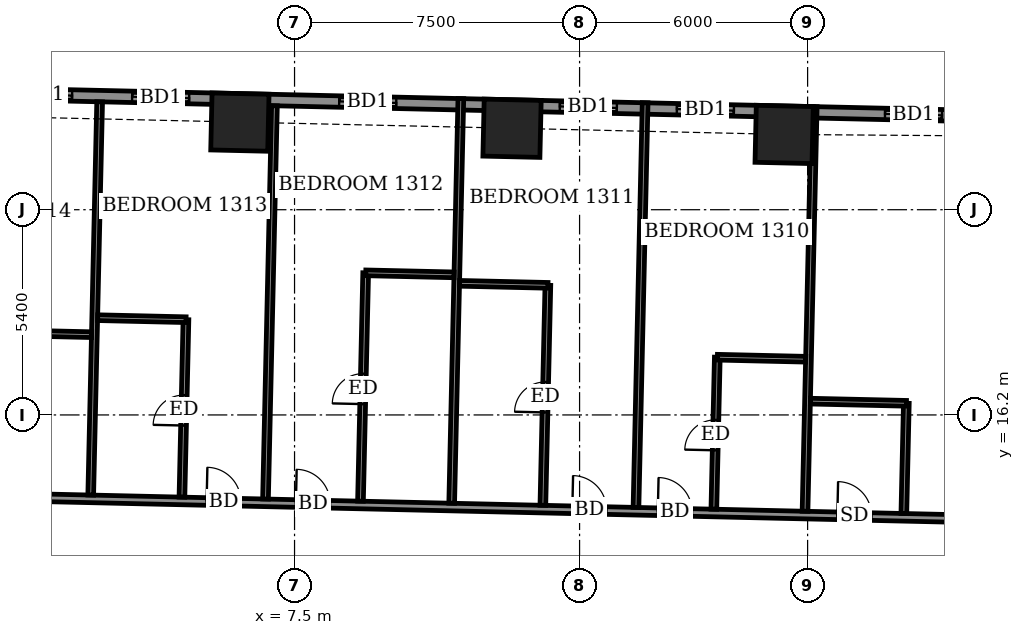
"""IFC4 building model, lengths in metres.
Left out: names, types, materials, properties, quantities, classifications, styles, units other than length and angle.
Written with IfcOpenShell. Run it as: python <this file> out.ifc"""

import sys

from ifc_helpers import new_model, si_unit, direction, frame, frame_2d, origin, origin_2d, place, context, subcontext, project, spatial, rectangle, extrude, element, fill, save


model = new_model("IFC4")
c1 = context("Model", 3, precision=1e-05, world=origin(), true_north=direction((0.0, 1.0)))
c2 = subcontext(c1, "Body", "Model", "MODEL_VIEW")
j1 = project(units=[si_unit("LENGTHUNIT", "METRE"), si_unit("PLANEANGLEUNIT", "RADIAN")], contexts=[c1])
p1 = place(None, origin())
s1 = spatial("IfcSite", under=j1, at=p1, CompositionType="ELEMENT")
p2 = place(p1, origin())
s2 = spatial("IfcBuilding", under=s1, at=p2, CompositionType="ELEMENT")
p3 = place(p2, frame((0.0, 0.0, 56.7)))
s3 = spatial("IfcBuildingStorey", under=s2, at=p3, CompositionType="ELEMENT", Elevation=56.7)
for number, where, z_axis, x_axis in (
    (1, (20.383, 23.58, -0.55), (0.0, 0.0, 1.0), (-1.0, 0.023, 0.0)),
    (2, (13.223, 23.743, -0.55), (0.0, 0.0, 1.0), (-1.0, 0.023, 0.0)),
    (3, (6.062, 23.905, -0.55), (0.0, 0.0, 1.0), (-1.0, 0.023, 0.0)),
):
    element("IfcColumn", number, at=place(p3, frame(where, z_axis=z_axis, x_axis=x_axis)), inside=s3, PredefinedType="COLUMN", context=c2, shape_type="SweptSolid", body=[
        extrude(rectangle(XDim=1.5, YDim=1.5, at=origin_2d()), origin(), (0.0, 0.0, 1.0), 3.6),
    ])
p4 = place(p3, frame((27.407, 24.021, 0.0), z_axis=(0.0, 0.0, 1.0), x_axis=(-0.99974239923, 0.022696589664, 0.0)))
e4 = element("IfcWall", 4, at=p4, inside=s3, PredefinedType="SOLIDWALL", context=c2, shape_type="SweptSolid", body=[
    extrude(rectangle(XDim=49.836, YDim=0.3, at=frame_2d((24.918, 0.0))), origin(), (0.0, 0.0, 1.0), 3.05),
])
p5 = place(p4, frame((2.871, 0.0, 0.0)))
e5 = element("IfcOpeningElement", 5, at=p5, cuts=e4, PredefinedType="OPENING", context=c2, shape_type="SweptSolid", body=[
    extrude(rectangle(XDim=1.5, YDim=2.4, at=frame_2d((0.75, 1.2))), frame((0.0, 0.16, 0.0), z_axis=(0.0, -1.0, 0.0), x_axis=(1.0, 0.0, 0.0)), (0.0, 0.0, 1.0), 0.32),
])
p6 = place(p4, frame((8.349, 0.0, 0.0)))
e6 = element("IfcOpeningElement", 6, at=p6, cuts=e4, PredefinedType="OPENING", context=c2, shape_type="SweptSolid", body=[
    extrude(rectangle(XDim=1.5, YDim=2.4, at=frame_2d((0.75, 1.2))), frame((0.0, 0.16, 0.0), z_axis=(0.0, -1.0, 0.0), x_axis=(1.0, 0.0, 0.0)), (0.0, 0.0, 1.0), 0.32),
])
p7 = place(p4, frame((11.43, 0.0, 0.0)))
e7 = element("IfcOpeningElement", 7, at=p7, cuts=e4, PredefinedType="OPENING", context=c2, shape_type="SweptSolid", body=[
    extrude(rectangle(XDim=1.5, YDim=2.4, at=frame_2d((0.75, 1.2))), frame((0.0, 0.16, 0.0), z_axis=(0.0, -1.0, 0.0), x_axis=(1.0, 0.0, 0.0)), (0.0, 0.0, 1.0), 0.32),
])
p8 = place(p4, frame((17.236, 0.0, 0.0)))
e8 = element("IfcOpeningElement", 8, at=p8, cuts=e4, PredefinedType="OPENING", context=c2, shape_type="SweptSolid", body=[
    extrude(rectangle(XDim=1.5, YDim=2.4, at=frame_2d((0.75, 1.2))), frame((0.0, 0.16, 0.0), z_axis=(0.0, -1.0, 0.0), x_axis=(1.0, 0.0, 0.0)), (0.0, 0.0, 1.0), 0.32),
])
p9 = place(p4, frame((22.686, 0.0, 0.0)))
e9 = element("IfcOpeningElement", 9, at=p9, cuts=e4, PredefinedType="OPENING", context=c2, shape_type="SweptSolid", body=[
    extrude(rectangle(XDim=1.5, YDim=2.4, at=frame_2d((0.75, 1.2))), frame((0.0, 0.16, 0.0), z_axis=(0.0, -1.0, 0.0), x_axis=(1.0, 0.0, 0.0)), (0.0, 0.0, 1.0), 0.32),
])
p10 = place(p4, frame((25.767, 0.0, 0.0)))
e10 = element("IfcOpeningElement", 10, at=p10, cuts=e4, PredefinedType="OPENING", context=c2, shape_type="SweptSolid", body=[
    extrude(rectangle(XDim=1.5, YDim=2.4, at=frame_2d((0.75, 1.2))), frame((0.0, 0.16, 0.0), z_axis=(0.0, -1.0, 0.0), x_axis=(1.0, 0.0, 0.0)), (0.0, 0.0, 1.0), 0.32),
])
p11 = place(p4, frame((31.211, 0.0, 0.0)))
e11 = element("IfcOpeningElement", 11, at=p11, cuts=e4, PredefinedType="OPENING", context=c2, shape_type="SweptSolid", body=[
    extrude(rectangle(XDim=1.5, YDim=2.4, at=frame_2d((0.75, 1.2))), frame((0.0, 0.16, 0.0), z_axis=(0.0, -1.0, 0.0), x_axis=(1.0, 0.0, 0.0)), (0.0, 0.0, 1.0), 0.32),
])
p12 = place(p4, frame((36.974, 0.0, 0.0)))
e12 = element("IfcOpeningElement", 12, at=p12, cuts=e4, PredefinedType="OPENING", context=c2, shape_type="SweptSolid", body=[
    extrude(rectangle(XDim=1.5, YDim=2.4, at=frame_2d((0.75, 1.2))), frame((0.0, 0.16, 0.0), z_axis=(0.0, -1.0, 0.0), x_axis=(1.0, 0.0, 0.0)), (0.0, 0.0, 1.0), 0.32),
])
p13 = place(p4, frame((40.055, 0.0, 0.0)))
e13 = element("IfcOpeningElement", 13, at=p13, cuts=e4, PredefinedType="OPENING", context=c2, shape_type="SweptSolid", body=[
    extrude(rectangle(XDim=1.5, YDim=2.4, at=frame_2d((0.75, 1.2))), frame((0.0, 0.16, 0.0), z_axis=(0.0, -1.0, 0.0), x_axis=(1.0, 0.0, 0.0)), (0.0, 0.0, 1.0), 0.32),
])
p14 = place(p4, frame((45.282, 0.0, 0.9)))
e14 = element("IfcOpeningElement", 14, at=p14, cuts=e4, PredefinedType="OPENING", context=c2, shape_type="SweptSolid", body=[
    extrude(rectangle(XDim=2.4, YDim=1.5, at=frame_2d((1.2, 0.75))), frame((0.0, 0.16, 0.0), z_axis=(0.0, -1.0, 0.0), x_axis=(1.0, 0.0, 0.0)), (0.0, 0.0, 1.0), 0.32),
])
p15 = place(p3, frame((-25.456, 14.618, 0.0), z_axis=(0.0, 0.0, 1.0), x_axis=(0.999742687583, -0.0226838847, 0.0)))
e15 = element("IfcWall", 15, at=p15, inside=s3, PredefinedType="PARTITIONING", context=c2, shape_type="SweptSolid", body=[
    extrude(rectangle(XDim=54.836, YDim=0.2, at=frame_2d((27.418, 0.0))), origin(), (0.0, 0.0, 1.0), 3.05),
])
p16 = place(p15, frame((52.493, 0.0, 0.0)))
e16 = element("IfcOpeningElement", 16, at=p16, cuts=e15, PredefinedType="OPENING", context=c2, shape_type="SweptSolid", body=[
    extrude(rectangle(XDim=1.0, YDim=2.1, at=frame_2d((0.5, 1.05))), frame((0.0, 0.11, 0.0), z_axis=(0.0, -1.0, 0.0), x_axis=(1.0, 0.0, 0.0)), (0.0, 0.0, 1.0), 0.22),
])
p17 = place(p15, frame((47.25, 0.0, 0.0)))
e17 = element("IfcOpeningElement", 17, at=p17, cuts=e15, PredefinedType="OPENING", context=c2, shape_type="SweptSolid", body=[
    extrude(rectangle(XDim=0.9, YDim=2.1, at=frame_2d((0.45, 1.05))), frame((0.0, 0.11, 0.0), z_axis=(0.0, -1.0, 0.0), x_axis=(1.0, 0.0, 0.0)), (0.0, 0.0, 1.0), 0.22),
])
p18 = place(p15, frame((42.525, 0.0, 0.0)))
e18 = element("IfcOpeningElement", 18, at=p18, cuts=e15, PredefinedType="OPENING", context=c2, shape_type="SweptSolid", body=[
    extrude(rectangle(XDim=0.9, YDim=2.1, at=frame_2d((0.45, 1.05))), frame((0.0, 0.11, 0.0), z_axis=(0.0, -1.0, 0.0), x_axis=(1.0, 0.0, 0.0)), (0.0, 0.0, 1.0), 0.22),
])
p19 = place(p15, frame((40.275, 0.0, 0.0)))
e19 = element("IfcOpeningElement", 19, at=p19, cuts=e15, PredefinedType="OPENING", context=c2, shape_type="SweptSolid", body=[
    extrude(rectangle(XDim=0.9, YDim=2.1, at=frame_2d((0.45, 1.05))), frame((0.0, 0.11, 0.0), z_axis=(0.0, -1.0, 0.0), x_axis=(1.0, 0.0, 0.0)), (0.0, 0.0, 1.0), 0.22),
])
p20 = place(p15, frame((33.0, 0.0, 0.0)))
e20 = element("IfcOpeningElement", 20, at=p20, cuts=e15, PredefinedType="OPENING", context=c2, shape_type="SweptSolid", body=[
    extrude(rectangle(XDim=0.9, YDim=2.1, at=frame_2d((0.45, 1.05))), frame((0.0, 0.11, 0.0), z_axis=(0.0, -1.0, 0.0), x_axis=(1.0, 0.0, 0.0)), (0.0, 0.0, 1.0), 0.22),
])
p21 = place(p15, frame((30.65, 0.0, 0.0)))
e21 = element("IfcOpeningElement", 21, at=p21, cuts=e15, PredefinedType="OPENING", context=c2, shape_type="SweptSolid", body=[
    extrude(rectangle(XDim=0.9, YDim=2.1, at=frame_2d((0.45, 1.05))), frame((0.0, 0.11, 0.0), z_axis=(0.0, -1.0, 0.0), x_axis=(1.0, 0.0, 0.0)), (0.0, 0.0, 1.0), 0.22),
])
p22 = place(p15, frame((23.7, 0.0, 0.0)))
e22 = element("IfcOpeningElement", 22, at=p22, cuts=e15, PredefinedType="OPENING", context=c2, shape_type="SweptSolid", body=[
    extrude(rectangle(XDim=0.9, YDim=2.1, at=frame_2d((0.45, 1.05))), frame((0.0, 0.11, 0.0), z_axis=(0.0, -1.0, 0.0), x_axis=(1.0, 0.0, 0.0)), (0.0, 0.0, 1.0), 0.22),
])
p23 = place(p15, frame((21.425, 0.0, 0.0)))
e23 = element("IfcOpeningElement", 23, at=p23, cuts=e15, PredefinedType="OPENING", context=c2, shape_type="SweptSolid", body=[
    extrude(rectangle(XDim=0.9, YDim=2.1, at=frame_2d((0.45, 1.05))), frame((0.0, 0.11, 0.0), z_axis=(0.0, -1.0, 0.0), x_axis=(1.0, 0.0, 0.0)), (0.0, 0.0, 1.0), 0.22),
])
p24 = place(p15, frame((14.15, 0.0, 0.0)))
e24 = element("IfcOpeningElement", 24, at=p24, cuts=e15, PredefinedType="OPENING", context=c2, shape_type="SweptSolid", body=[
    extrude(rectangle(XDim=0.9, YDim=2.1, at=frame_2d((0.45, 1.05))), frame((0.0, 0.11, 0.0), z_axis=(0.0, -1.0, 0.0), x_axis=(1.0, 0.0, 0.0)), (0.0, 0.0, 1.0), 0.22),
])
p25 = place(p15, frame((11.625, 0.0, 0.0)))
e25 = element("IfcOpeningElement", 25, at=p25, cuts=e15, PredefinedType="OPENING", context=c2, shape_type="SweptSolid", body=[
    extrude(rectangle(XDim=0.9, YDim=2.1, at=frame_2d((0.45, 1.05))), frame((0.0, 0.11, 0.0), z_axis=(0.0, -1.0, 0.0), x_axis=(1.0, 0.0, 0.0)), (0.0, 0.0, 1.0), 0.22),
])
p26 = place(p15, frame((1.425, 0.0, 0.0)))
e26 = element("IfcOpeningElement", 26, at=p26, cuts=e15, PredefinedType="OPENING", context=c2, shape_type="SweptSolid", body=[
    extrude(rectangle(XDim=1.0, YDim=2.1, at=frame_2d((0.5, 1.05))), frame((0.0, 0.11, 0.0), z_axis=(0.0, -1.0, 0.0), x_axis=(1.0, 0.0, 0.0)), (0.0, 0.0, 1.0), 0.22),
])
p27 = place(p15, frame((6.75, 0.0, 0.0)))
e27 = element("IfcOpeningElement", 27, at=p27, cuts=e15, PredefinedType="OPENING", context=c2, shape_type="SweptSolid", body=[
    extrude(rectangle(XDim=0.9, YDim=2.1, at=frame_2d((0.45, 1.05))), frame((0.0, 0.11, 0.0), z_axis=(0.0, -1.0, 0.0), x_axis=(1.0, 0.0, 0.0)), (0.0, 0.0, 1.0), 0.22),
])
p28 = place(p3, frame((2.137, 14.092, 0.0), z_axis=(0.0, 0.0, 1.0), x_axis=(0.022716582742, 0.999741945138, 0.0)))
e28 = element("IfcWall", 28, at=p28, inside=s3, PredefinedType="PARTITIONING", context=c2, shape_type="SweptSolid", body=[
    extrude(rectangle(XDim=10.35, YDim=0.15, at=frame_2d((5.175, 0.0))), origin(), (0.0, 0.0, 1.0), 2.55),
])
p29 = place(p3, frame((4.537, 14.037, 0.0), z_axis=(0.0, 0.0, 1.0), x_axis=(0.022688155425, 0.999742590672, 0.0)))
e29 = element("IfcWall", 29, at=p29, inside=s3, PredefinedType="PARTITIONING", context=c2, shape_type="SweptSolid", body=[
    extrude(rectangle(XDim=4.67, YDim=0.15, at=frame_2d((2.335, 0.0))), origin(), (0.0, 0.0, 1.0), 3.05),
])
p30 = place(p29, frame((1.885, 0.0, 0.0)))
e30 = element("IfcOpeningElement", 30, at=p30, cuts=e29, PredefinedType="OPENING", context=c2, shape_type="SweptSolid", body=[
    extrude(rectangle(XDim=0.8, YDim=2.1, at=frame_2d((0.4, 1.05))), frame((0.0, 0.085, 0.0), z_axis=(0.0, -1.0, 0.0), x_axis=(1.0, 0.0, 0.0)), (0.0, 0.0, 1.0), 0.17),
])
p31 = place(p3, frame((6.736, 13.988, 0.0), z_axis=(0.0, 0.0, 1.0), x_axis=(0.022693005506, 0.999742480592, 0.0)))
e31 = element("IfcWall", 31, at=p31, inside=s3, PredefinedType="PARTITIONING", context=c2, shape_type="SweptSolid", body=[
    extrude(rectangle(XDim=10.35, YDim=0.15, at=frame_2d((5.175, 0.0))), origin(), (0.0, 0.0, 1.0), 2.55),
])
p32 = place(p3, frame((9.235, 13.931, 0.0), z_axis=(0.0, 0.0, 1.0), x_axis=(0.022790616683, 0.999740260163, 0.0)))
e32 = element("IfcWall", 32, at=p32, inside=s3, PredefinedType="PARTITIONING", context=c2, shape_type="SweptSolid", body=[
    extrude(rectangle(XDim=6.01, YDim=0.15, at=frame_2d((3.005, 0.0))), origin(), (0.0, 0.0, 1.0), 3.05),
])
p33 = place(p32, frame((2.555, 0.0, 0.0)))
e33 = element("IfcOpeningElement", 33, at=p33, cuts=e32, PredefinedType="OPENING", context=c2, shape_type="SweptSolid", body=[
    extrude(rectangle(XDim=0.8, YDim=2.1, at=frame_2d((0.4, 1.05))), frame((0.0, 0.085, 0.0), z_axis=(0.0, -1.0, 0.0), x_axis=(1.0, 0.0, 0.0)), (0.0, 0.0, 1.0), 0.17),
])
p34 = place(p3, frame((11.635, 13.876, 0.0), z_axis=(0.0, 0.0, 1.0), x_axis=(0.022624555408, 0.999744031986, 0.0)))
e34 = element("IfcWall", 34, at=p34, inside=s3, PredefinedType="PARTITIONING", context=c2, shape_type="SweptSolid", body=[
    extrude(rectangle(XDim=10.651, YDim=0.15, at=frame_2d((5.325, 0.0))), origin(), (0.0, 0.0, 1.0), 2.55),
])
p35 = place(p3, frame((14.034, 13.822, 0.0), z_axis=(0.0, 0.0, 1.0), x_axis=(0.022813362582, 0.999739741377, 0.0)))
e35 = element("IfcWall", 35, at=p35, inside=s3, PredefinedType="PARTITIONING", context=c2, shape_type="SweptSolid", body=[
    extrude(rectangle(XDim=5.79, YDim=0.15, at=frame_2d((2.895, 0.0))), origin(), (0.0, 0.0, 1.0), 3.05),
])
p36 = place(p35, frame((2.445, 0.0, 0.0)))
e36 = element("IfcOpeningElement", 36, at=p36, cuts=e35, PredefinedType="OPENING", context=c2, shape_type="SweptSolid", body=[
    extrude(rectangle(XDim=0.8, YDim=2.1, at=frame_2d((0.4, 1.05))), frame((0.0, 0.085, 0.0), z_axis=(0.0, -1.0, 0.0), x_axis=(1.0, 0.0, 0.0)), (0.0, 0.0, 1.0), 0.17),
])
p37 = place(p3, frame((16.484, 13.766, 0.0), z_axis=(0.0, 0.0, 1.0), x_axis=(0.022647466205, 0.999743513245, 0.0)))
e37 = element("IfcWall", 37, at=p37, inside=s3, PredefinedType="PARTITIONING", context=c2, shape_type="SweptSolid", body=[
    extrude(rectangle(XDim=10.651, YDim=0.15, at=frame_2d((5.325, 0.0))), origin(), (0.0, 0.0, 1.0), 2.55),
])
p38 = place(p3, frame((18.533, 13.72, 0.0), z_axis=(0.0, 0.0, 1.0), x_axis=(0.022765770952, 0.999740826251, 0.0)))
e38 = element("IfcWall", 38, at=p38, inside=s3, PredefinedType="PARTITIONING", context=c2, shape_type="SweptSolid", body=[
    extrude(rectangle(XDim=4.0, YDim=0.15, at=frame_2d((2.0, 0.0))), origin(), (0.0, 0.0, 1.0), 3.05),
])
p39 = place(p38, frame((1.55, 0.0, 0.0)))
e39 = element("IfcOpeningElement", 39, at=p39, cuts=e38, PredefinedType="OPENING", context=c2, shape_type="SweptSolid", body=[
    extrude(rectangle(XDim=0.8, YDim=2.1, at=frame_2d((0.4, 1.05))), frame((0.0, 0.085, 0.0), z_axis=(0.0, -1.0, 0.0), x_axis=(1.0, 0.0, 0.0)), (0.0, 0.0, 1.0), 0.17),
])
p40 = place(p3, frame((20.932, 13.665, 0.0), z_axis=(0.0, 0.0, 1.0), x_axis=(0.022739109038, 0.999741433032, 0.0)))
e40 = element("IfcWall", 40, at=p40, inside=s3, PredefinedType="PARTITIONING", context=c2, shape_type="SweptSolid", body=[
    extrude(rectangle(XDim=10.651, YDim=0.15, at=frame_2d((5.325, 0.0))), origin(), (0.0, 0.0, 1.0), 2.55),
])
p41 = place(p3, frame((23.532, 13.606, 0.0), z_axis=(0.0, 0.0, 1.0), x_axis=(0.022723317103, 0.999741792094, 0.0)))
e41 = element("IfcWall", 41, at=p41, inside=s3, PredefinedType="PARTITIONING", context=c2, shape_type="SweptSolid", body=[
    extrude(rectangle(XDim=2.901, YDim=0.15, at=frame_2d((1.45, 0.0))), origin(), (0.0, 0.0, 1.0), 3.05),
])
p42 = place(p3, frame((21.075, 16.563, 0.0), z_axis=(0.0, 0.0, 1.0), x_axis=(0.999746356616, -0.022521599255, 0.0)))
e42 = element("IfcWall", 42, at=p42, inside=s3, PredefinedType="PARTITIONING", context=c2, shape_type="SweptSolid", body=[
    extrude(rectangle(XDim=2.526, YDim=0.15, at=frame_2d((1.263, 0.0))), origin(), (0.0, 0.0, 1.0), 3.05),
])
for number, where, z_axis, x_axis in (
    (43, (18.626, 17.719, 0.0), (0.0, 0.0, 1.0), (1.0, -0.023, 0.0)),
    (44, (-0.164, 18.365, 0.0), (0.0, 0.0, 1.0), (1.0, -0.023, 0.0)),
):
    element("IfcWall", number, at=place(p3, frame(where, z_axis=z_axis, x_axis=x_axis)), inside=s3, PredefinedType="PARTITIONING", context=c2, shape_type="SweptSolid", body=[
        extrude(rectangle(XDim=2.324, YDim=0.15, at=frame_2d((1.162, 0.0))), origin(), (0.0, 0.0, 1.0), 3.05),
    ])
for number, where, z_axis, x_axis in (
    (45, (2.32, 18.759, 0.0), (0.0, 0.0, 1.0), (1.0, -0.023, 0.0)),
    (46, (11.843, 19.663, 0.0), (0.0, 0.0, 1.0), (1.0, -0.023, 0.0)),
):
    element("IfcWall", number, at=place(p3, frame(where, z_axis=z_axis, x_axis=x_axis)), inside=s3, PredefinedType="PARTITIONING", context=c2, shape_type="SweptSolid", body=[
        extrude(rectangle(XDim=2.325, YDim=0.15, at=frame_2d((1.163, 0.0))), origin(), (0.0, 0.0, 1.0), 3.05),
    ])
p43 = place(p3, frame((9.374, 19.939, 0.0), z_axis=(0.0, 0.0, 1.0), x_axis=(0.999740260747, -0.02279059109, 0.0)))
e47 = element("IfcWall", 47, at=p43, inside=s3, PredefinedType="PARTITIONING", context=c2, shape_type="SweptSolid", body=[
    extrude(rectangle(XDim=2.324, YDim=0.15, at=frame_2d((1.162, 0.0))), origin(), (0.0, 0.0, 1.0), 3.05),
])
p44 = place(p5, origin())
e48 = element("IfcDoor", 48, at=p44, inside=s3, OperationType="SLIDING_TO_LEFT", PredefinedType="DOOR", context=c2, shape_type="SweptSolid", body=[
    extrude(rectangle(XDim=1.5, YDim=2.4, at=frame_2d((0.75, 1.2))), frame((0.0, 0.025, 0.0), z_axis=(0.0, -1.0, 0.0), x_axis=(1.0, 0.0, 0.0)), (0.0, 0.0, 1.0), 0.05),
])
fill(e5, e48)
p45 = place(p6, origin())
e49 = element("IfcDoor", 49, at=p45, inside=s3, OperationType="SLIDING_TO_LEFT", PredefinedType="DOOR", context=c2, shape_type="SweptSolid", body=[
    extrude(rectangle(XDim=1.5, YDim=2.4, at=frame_2d((0.75, 1.2))), frame((0.0, 0.025, 0.0), z_axis=(0.0, -1.0, 0.0), x_axis=(1.0, 0.0, 0.0)), (0.0, 0.0, 1.0), 0.05),
])
fill(e6, e49)
p46 = place(p7, origin())
e50 = element("IfcDoor", 50, at=p46, inside=s3, OperationType="SLIDING_TO_LEFT", PredefinedType="DOOR", context=c2, shape_type="SweptSolid", body=[
    extrude(rectangle(XDim=1.5, YDim=2.4, at=frame_2d((0.75, 1.2))), frame((0.0, 0.025, 0.0), z_axis=(0.0, -1.0, 0.0), x_axis=(1.0, 0.0, 0.0)), (0.0, 0.0, 1.0), 0.05),
])
fill(e7, e50)
p47 = place(p8, origin())
e51 = element("IfcDoor", 51, at=p47, inside=s3, OperationType="SLIDING_TO_LEFT", PredefinedType="DOOR", context=c2, shape_type="SweptSolid", body=[
    extrude(rectangle(XDim=1.5, YDim=2.4, at=frame_2d((0.75, 1.2))), frame((0.0, 0.025, 0.0), z_axis=(0.0, -1.0, 0.0), x_axis=(1.0, 0.0, 0.0)), (0.0, 0.0, 1.0), 0.05),
])
fill(e8, e51)
p48 = place(p9, origin())
e52 = element("IfcDoor", 52, at=p48, inside=s3, OperationType="SLIDING_TO_LEFT", PredefinedType="DOOR", context=c2, shape_type="SweptSolid", body=[
    extrude(rectangle(XDim=1.5, YDim=2.4, at=frame_2d((0.75, 1.2))), frame((0.0, 0.025, 0.0), z_axis=(0.0, -1.0, 0.0), x_axis=(1.0, 0.0, 0.0)), (0.0, 0.0, 1.0), 0.05),
])
fill(e9, e52)
p49 = place(p10, origin())
e53 = element("IfcDoor", 53, at=p49, inside=s3, OperationType="SLIDING_TO_LEFT", PredefinedType="DOOR", context=c2, shape_type="SweptSolid", body=[
    extrude(rectangle(XDim=1.5, YDim=2.4, at=frame_2d((0.75, 1.2))), frame((0.0, 0.025, 0.0), z_axis=(0.0, -1.0, 0.0), x_axis=(1.0, 0.0, 0.0)), (0.0, 0.0, 1.0), 0.05),
])
fill(e10, e53)
p50 = place(p17, origin())
e54 = element("IfcDoor", 54, at=p50, inside=s3, OperationType="SINGLE_SWING_LEFT", PredefinedType="DOOR", context=c2, shape_type="SweptSolid", body=[
    extrude(rectangle(XDim=0.9, YDim=2.1, at=frame_2d((0.45, 1.05))), frame((0.0, 0.025, 0.0), z_axis=(0.0, -1.0, 0.0), x_axis=(1.0, 0.0, 0.0)), (0.0, 0.0, 1.0), 0.05),
])
fill(e17, e54)
p51 = place(p18, origin())
e55 = element("IfcDoor", 55, at=p51, inside=s3, OperationType="SINGLE_SWING_RIGHT", PredefinedType="DOOR", context=c2, shape_type="SweptSolid", body=[
    extrude(rectangle(XDim=0.9, YDim=2.1, at=frame_2d((0.45, 1.05))), frame((0.0, 0.025, 0.0), z_axis=(0.0, -1.0, 0.0), x_axis=(1.0, 0.0, 0.0)), (0.0, 0.0, 1.0), 0.05),
])
fill(e18, e55)
p52 = place(p39, origin())
e56 = element("IfcDoor", 56, at=p52, inside=s3, OperationType="SINGLE_SWING_RIGHT", PredefinedType="DOOR", context=c2, shape_type="SweptSolid", body=[
    extrude(rectangle(XDim=0.8, YDim=2.1, at=frame_2d((0.4, 1.05))), frame((0.0, 0.025, 0.0), z_axis=(0.0, -1.0, 0.0), x_axis=(1.0, 0.0, 0.0)), (0.0, 0.0, 1.0), 0.05),
])
fill(e39, e56)
p53 = place(p19, origin())
e57 = element("IfcDoor", 57, at=p53, inside=s3, OperationType="SINGLE_SWING_LEFT", PredefinedType="DOOR", context=c2, shape_type="SweptSolid", body=[
    extrude(rectangle(XDim=0.9, YDim=2.1, at=frame_2d((0.45, 1.05))), frame((0.0, 0.025, 0.0), z_axis=(0.0, -1.0, 0.0), x_axis=(1.0, 0.0, 0.0)), (0.0, 0.0, 1.0), 0.05),
])
fill(e19, e57)
p54 = place(p36, origin())
e58 = element("IfcDoor", 58, at=p54, inside=s3, OperationType="SINGLE_SWING_LEFT", PredefinedType="DOOR", context=c2, shape_type="SweptSolid", body=[
    extrude(rectangle(XDim=0.8, YDim=2.1, at=frame_2d((0.4, 1.05))), frame((0.0, 0.025, 0.0), z_axis=(0.0, -1.0, 0.0), x_axis=(1.0, 0.0, 0.0)), (0.0, 0.0, 1.0), 0.05),
])
fill(e36, e58)
p55 = place(p20, origin())
e59 = element("IfcDoor", 59, at=p55, inside=s3, OperationType="SINGLE_SWING_RIGHT", PredefinedType="DOOR", context=c2, shape_type="SweptSolid", body=[
    extrude(rectangle(XDim=0.9, YDim=2.1, at=frame_2d((0.45, 1.05))), frame((0.0, 0.025, 0.0), z_axis=(0.0, -1.0, 0.0), x_axis=(1.0, 0.0, 0.0)), (0.0, 0.0, 1.0), 0.05),
])
fill(e20, e59)
p56 = place(p33, origin())
e60 = element("IfcDoor", 60, at=p56, inside=s3, OperationType="SINGLE_SWING_RIGHT", PredefinedType="DOOR", context=c2, shape_type="SweptSolid", body=[
    extrude(rectangle(XDim=0.8, YDim=2.1, at=frame_2d((0.4, 1.05))), frame((0.0, 0.025, 0.0), z_axis=(0.0, -1.0, 0.0), x_axis=(1.0, 0.0, 0.0)), (0.0, 0.0, 1.0), 0.05),
])
fill(e33, e60)
p57 = place(p21, origin())
e61 = element("IfcDoor", 61, at=p57, inside=s3, OperationType="SINGLE_SWING_LEFT", PredefinedType="DOOR", context=c2, shape_type="SweptSolid", body=[
    extrude(rectangle(XDim=0.9, YDim=2.1, at=frame_2d((0.45, 1.05))), frame((0.0, 0.025, 0.0), z_axis=(0.0, -1.0, 0.0), x_axis=(1.0, 0.0, 0.0)), (0.0, 0.0, 1.0), 0.05),
])
fill(e21, e61)
p58 = place(p30, origin())
e62 = element("IfcDoor", 62, at=p58, inside=s3, OperationType="SINGLE_SWING_LEFT", PredefinedType="DOOR", context=c2, shape_type="SweptSolid", body=[
    extrude(rectangle(XDim=0.8, YDim=2.1, at=frame_2d((0.4, 1.05))), frame((0.0, 0.025, 0.0), z_axis=(0.0, -1.0, 0.0), x_axis=(1.0, 0.0, 0.0)), (0.0, 0.0, 1.0), 0.05),
])
fill(e30, e62)
save(model, sys.argv[1])
